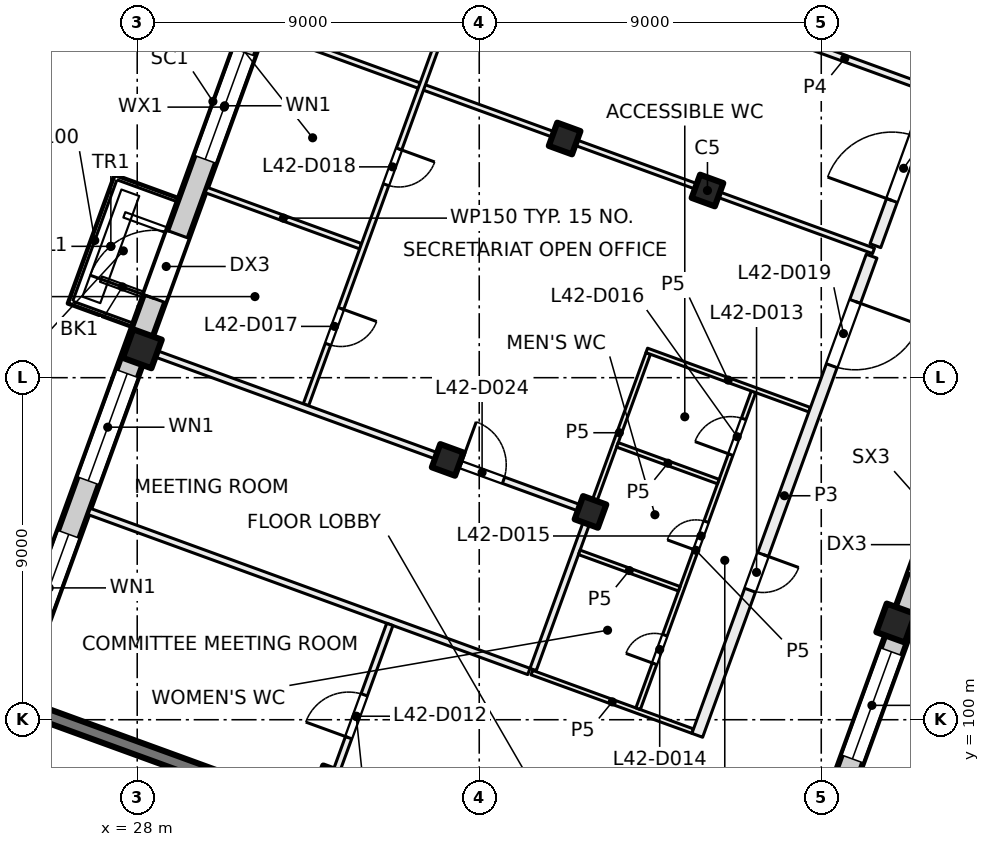
"""IFC4 building model, lengths in metres.
Left out: names, types, materials, properties, quantities, classifications, styles, units other than length and angle.
Written with IfcOpenShell. Run it as: python <this file> out.ifc"""

import sys

from ifc_helpers import new_model, si_unit, direction, frame, frame_2d, origin, origin_2d, place, context, subcontext, project, spatial, rectangle, extrude, element, fill, save


model = new_model("IFC4")
c1 = context("Model", 3, precision=1e-05, world=origin(), true_north=direction((0.0, 1.0)))
c2 = subcontext(c1, "Body", "Model", "MODEL_VIEW")
j1 = project(units=[si_unit("LENGTHUNIT", "METRE"), si_unit("PLANEANGLEUNIT", "RADIAN")], contexts=[c1])
p1 = place(None, origin())
s1 = spatial("IfcSite", under=j1, at=p1, CompositionType="ELEMENT")
p2 = place(p1, origin())
s2 = spatial("IfcBuilding", under=s1, at=p2, CompositionType="ELEMENT")
p3 = place(p2, frame((0.0, 0.0, 178.5)))
s3 = spatial("IfcBuildingStorey", under=s2, at=p3, CompositionType="ELEMENT", Elevation=178.5)
for number, where, z_axis, x_axis in (
    (1, (43.006, 113.925, 0.0), (0.0, 0.0, 1.0), (-0.342, -0.94, 0.0)),
    (2, (39.927, 105.468, 0.0), (0.0, 0.0, 1.0), (-0.342, -0.94, 0.0)),
    (3, (39.247, 115.293, 0.0), (0.0, 0.0, 1.0), (-0.342, -0.94, 0.0)),
    (4, (36.169, 106.836, 0.0), (0.0, 0.0, 1.0), (-0.342, -0.94, 0.0)),
    (5, (33.091, 98.379, 0.0), (0.0, 0.0, 1.0), (-0.342, -0.94, 0.0)),
):
    element("IfcColumn", number, at=place(p3, frame(where, z_axis=z_axis, x_axis=x_axis)), inside=s3, PredefinedType="COLUMN", context=c2, shape_type="SweptSolid", body=[
        extrude(rectangle(XDim=0.65, YDim=0.65, at=origin_2d()), origin(), (0.0, 0.0, 1.0), 4.0),
    ])
for number, where, z_axis, x_axis in (
    (6, (47.962, 102.544, 0.0), (0.0, 0.0, 1.0), (-0.342, -0.94, 0.0)),
    (7, (28.134, 109.76, 0.0), (0.0, 0.0, 1.0), (-0.342, -0.94, 0.0)),
):
    element("IfcColumn", number, at=place(p3, frame(where, z_axis=z_axis, x_axis=x_axis)), inside=s3, PredefinedType="COLUMN", context=c2, shape_type="SweptSolid", body=[
        extrude(rectangle(XDim=0.8, YDim=0.8, at=origin_2d()), origin(), (0.0, 0.0, 1.0), 4.0),
    ])
p4 = place(p3, frame((32.962, 97.441, 0.0), z_axis=(0.0, 0.0, 1.0), x_axis=(-0.939689545667, 0.342028592028, 0.0)))
e8 = element("IfcWall", 8, at=p4, inside=s3, PredefinedType="SHEAR", context=c2, shape_type="SweptSolid", body=[
    extrude(rectangle(XDim=8.65, YDim=0.35, at=frame_2d((4.325, 0.0))), origin(), (0.0, 0.0, 1.0), 4.0),
])
p5 = place(p3, frame((52.212, 113.783, 0.0), z_axis=(0.0, 0.0, 1.0), x_axis=(-0.34202521188, -0.939690775968, 0.0)))
e9 = element("IfcWall", 9, at=p5, inside=s3, PredefinedType="SOLIDWALL", context=c2, shape_type="SweptSolid", body=[
    extrude(rectangle(XDim=21.745, YDim=0.6, at=frame_2d((10.873, 0.0))), origin(), (0.0, 0.0, 1.0), 3.625),
])
p6 = place(p5, frame((3.765, 0.0, 0.9)))
e10 = element("IfcOpeningElement", 10, at=p6, cuts=e9, PredefinedType="OPENING", context=c2, shape_type="SweptSolid", body=[
    extrude(rectangle(XDim=3.0, YDim=2.4, at=frame_2d((1.5, 1.2))), frame((0.0, 0.31, 0.0), z_axis=(0.0, -1.0, 0.0), x_axis=(1.0, 0.0, 0.0)), (0.0, 0.0, 1.0), 0.62),
])
p7 = place(p5, frame((8.865, 0.0, 0.0)))
e11 = element("IfcOpeningElement", 11, at=p7, cuts=e9, PredefinedType="OPENING", context=c2, shape_type="SweptSolid", body=[
    extrude(rectangle(XDim=1.8, YDim=2.4, at=frame_2d((0.9, 1.2))), frame((0.0, 0.31, 0.0), z_axis=(0.0, -1.0, 0.0), x_axis=(1.0, 0.0, 0.0)), (0.0, 0.0, 1.0), 0.62),
])
p8 = place(p5, frame((12.765, 0.0, 0.9)))
e12 = element("IfcOpeningElement", 12, at=p8, cuts=e9, PredefinedType="OPENING", context=c2, shape_type="SweptSolid", body=[
    extrude(rectangle(XDim=3.0, YDim=2.4, at=frame_2d((1.5, 1.2))), frame((0.0, 0.31, 0.0), z_axis=(0.0, -1.0, 0.0), x_axis=(1.0, 0.0, 0.0)), (0.0, 0.0, 1.0), 0.62),
])
p9 = place(p5, frame((17.265, 0.0, 0.9)))
e13 = element("IfcOpeningElement", 13, at=p9, cuts=e9, PredefinedType="OPENING", context=c2, shape_type="SweptSolid", body=[
    extrude(rectangle(XDim=3.0, YDim=2.4, at=frame_2d((1.5, 1.2))), frame((0.0, 0.31, 0.0), z_axis=(0.0, -1.0, 0.0), x_axis=(1.0, 0.0, 0.0)), (0.0, 0.0, 1.0), 0.62),
])
p10 = place(p3, frame((24.666, 100.669, 0.0), z_axis=(0.0, 0.0, 1.0), x_axis=(0.34201964167, 0.939692803373, 0.0)))
e14 = element("IfcWall", 14, at=p10, inside=s3, PredefinedType="SOLIDWALL", context=c2, shape_type="SweptSolid", body=[
    extrude(rectangle(XDim=32.884, YDim=0.6, at=frame_2d((16.442, 0.0))), origin(), (0.0, 0.0, 1.0), 3.625),
])
p11 = place(p10, frame((1.48, 0.0, 0.9)))
e15 = element("IfcOpeningElement", 15, at=p11, cuts=e14, PredefinedType="OPENING", context=c2, shape_type="SweptSolid", body=[
    extrude(rectangle(XDim=3.0, YDim=2.4, at=frame_2d((1.5, 1.2))), frame((0.0, 0.31, 0.0), z_axis=(0.0, -1.0, 0.0), x_axis=(1.0, 0.0, 0.0)), (0.0, 0.0, 1.0), 0.62),
])
p12 = place(p10, frame((5.98, 0.0, 0.9)))
e16 = element("IfcOpeningElement", 16, at=p12, cuts=e14, PredefinedType="OPENING", context=c2, shape_type="SweptSolid", body=[
    extrude(rectangle(XDim=3.0, YDim=2.4, at=frame_2d((1.5, 1.2))), frame((0.0, 0.31, 0.0), z_axis=(0.0, -1.0, 0.0), x_axis=(1.0, 0.0, 0.0)), (0.0, 0.0, 1.0), 0.62),
])
p13 = place(p10, frame((11.08, 0.0, 0.0)))
e17 = element("IfcOpeningElement", 17, at=p13, cuts=e14, PredefinedType="OPENING", context=c2, shape_type="SweptSolid", body=[
    extrude(rectangle(XDim=1.8, YDim=2.4, at=frame_2d((0.9, 1.2))), frame((0.0, 0.31, 0.0), z_axis=(0.0, -1.0, 0.0), x_axis=(1.0, 0.0, 0.0)), (0.0, 0.0, 1.0), 0.62),
])
p14 = place(p10, frame((14.98, 0.0, 0.9)))
e18 = element("IfcOpeningElement", 18, at=p14, cuts=e14, PredefinedType="OPENING", context=c2, shape_type="SweptSolid", body=[
    extrude(rectangle(XDim=3.0, YDim=2.4, at=frame_2d((1.5, 1.2))), frame((0.0, 0.31, 0.0), z_axis=(0.0, -1.0, 0.0), x_axis=(1.0, 0.0, 0.0)), (0.0, 0.0, 1.0), 0.62),
])
p15 = place(p10, frame((19.48, 0.0, 0.9)))
e19 = element("IfcOpeningElement", 19, at=p15, cuts=e14, PredefinedType="OPENING", context=c2, shape_type="SweptSolid", body=[
    extrude(rectangle(XDim=3.0, YDim=2.4, at=frame_2d((1.5, 1.2))), frame((0.0, 0.31, 0.0), z_axis=(0.0, -1.0, 0.0), x_axis=(1.0, 0.0, 0.0)), (0.0, 0.0, 1.0), 0.62),
])
p16 = place(p10, frame((24.58, 0.0, 0.0)))
e20 = element("IfcOpeningElement", 20, at=p16, cuts=e14, PredefinedType="OPENING", context=c2, shape_type="SweptSolid", body=[
    extrude(rectangle(XDim=1.8, YDim=2.4, at=frame_2d((0.9, 1.2))), frame((0.0, 0.31, 0.0), z_axis=(0.0, -1.0, 0.0), x_axis=(1.0, 0.0, 0.0)), (0.0, 0.0, 1.0), 0.62),
])
p17 = place(p10, frame((28.48, 0.0, 0.9)))
e21 = element("IfcOpeningElement", 21, at=p17, cuts=e14, PredefinedType="OPENING", context=c2, shape_type="SweptSolid", body=[
    extrude(rectangle(XDim=3.0, YDim=2.4, at=frame_2d((1.5, 1.2))), frame((0.0, 0.31, 0.0), z_axis=(0.0, -1.0, 0.0), x_axis=(1.0, 0.0, 0.0)), (0.0, 0.0, 1.0), 0.62),
])
p18 = place(p3, frame((26.736, 105.48, 0.0), z_axis=(0.0, 0.0, 1.0), x_axis=(0.939721611154, -0.341940482438, 0.0)))
e22 = element("IfcWall", 22, at=p18, inside=s3, PredefinedType="PARTITIONING", context=c2, shape_type="SweptSolid", body=[
    extrude(rectangle(XDim=12.312, YDim=0.175, at=frame_2d((6.156, 0.0))), origin(), (0.0, 0.0, 1.0), 3.625),
])
p19 = place(p3, frame((29.814, 113.938, 0.0), z_axis=(0.0, 0.0, 1.0), x_axis=(0.93973078783, -0.341915262023, 0.0)))
e23 = element("IfcWall", 23, at=p19, inside=s3, PredefinedType="PARTITIONING", context=c2, shape_type="SweptSolid", body=[
    extrude(rectangle(XDim=4.326, YDim=0.15, at=frame_2d((2.163, 0.0))), origin(), (0.0, 0.0, 1.0), 3.625),
])
p20 = place(p3, frame((31.353, 118.166, 0.0), z_axis=(0.0, 0.0, 1.0), x_axis=(0.939701413127, -0.341995985602, 0.0)))
e24 = element("IfcWall", 24, at=p20, inside=s3, PredefinedType="PARTITIONING", context=c2, shape_type="SweptSolid", body=[
    extrude(rectangle(XDim=17.05, YDim=0.15, at=frame_2d((8.525, 0.0))), origin(), (0.0, 0.0, 1.0), 3.625),
])
p21 = place(p3, frame((37.053, 120.96, 0.0), z_axis=(0.0, 0.0, 1.0), x_axis=(-0.342023551531, -0.939691380293, 0.0)))
e25 = element("IfcWall", 25, at=p21, inside=s3, PredefinedType="PARTITIONING", context=c2, shape_type="SweptSolid", body=[
    extrude(rectangle(XDim=13.488, YDim=0.15, at=frame_2d((6.744, 0.0))), origin(), (0.0, 0.0, 1.0), 3.625),
])
p22 = place(p21, frame((10.791, 0.0, 0.0)))
e26 = element("IfcOpeningElement", 26, at=p22, cuts=e25, PredefinedType="OPENING", context=c2, shape_type="SweptSolid", body=[
    extrude(rectangle(XDim=1.0, YDim=2.1, at=frame_2d((0.5, 1.05))), frame((0.0, 0.085, 0.0), z_axis=(0.0, -1.0, 0.0), x_axis=(1.0, 0.0, 0.0)), (0.0, 0.0, 1.0), 0.17),
])
p23 = place(p21, frame((6.324, 0.0, 0.0)))
e27 = element("IfcOpeningElement", 27, at=p23, cuts=e25, PredefinedType="OPENING", context=c2, shape_type="SweptSolid", body=[
    extrude(rectangle(XDim=1.0, YDim=2.1, at=frame_2d((0.5, 1.05))), frame((0.0, 0.085, 0.0), z_axis=(0.0, -1.0, 0.0), x_axis=(1.0, 0.0, 0.0)), (0.0, 0.0, 1.0), 0.17),
])
p24 = place(p21, frame((1.824, 0.0, 0.0)))
e28 = element("IfcOpeningElement", 28, at=p24, cuts=e25, PredefinedType="OPENING", context=c2, shape_type="SweptSolid", body=[
    extrude(rectangle(XDim=1.0, YDim=2.1, at=frame_2d((0.5, 1.05))), frame((0.0, 0.085, 0.0), z_axis=(0.0, -1.0, 0.0), x_axis=(1.0, 0.0, 0.0)), (0.0, 0.0, 1.0), 0.17),
])
p25 = place(p3, frame((32.881, 97.657, 0.0), z_axis=(0.0, 0.0, 1.0), x_axis=(0.342058204353, 0.939678766832, 0.0)))
e29 = element("IfcWall", 29, at=p25, inside=s3, PredefinedType="PARTITIONING", context=c2, shape_type="SweptSolid", body=[
    extrude(rectangle(XDim=5.163, YDim=0.175, at=frame_2d((2.581, 0.0))), origin(), (0.0, 0.0, 1.0), 3.625),
])
p26 = place(p25, frame((1.991, 0.0, 0.0)))
e30 = element("IfcOpeningElement", 30, at=p26, cuts=e29, PredefinedType="OPENING", context=c2, shape_type="SweptSolid", body=[
    extrude(rectangle(XDim=1.2, YDim=2.1, at=frame_2d((0.6, 1.05))), frame((0.0, 0.097, 0.0), z_axis=(0.0, -1.0, 0.0), x_axis=(1.0, 0.0, 0.0)), (0.0, 0.0, 1.0), 0.195),
])
p27 = place(p3, frame((38.385, 101.24, 0.0), z_axis=(0.0, 0.0, 1.0), x_axis=(0.939711088937, -0.341969398235, 0.0)))
e31 = element("IfcWall", 31, at=p27, inside=s3, PredefinedType="PARTITIONING", context=c2, shape_type="SweptSolid", body=[
    extrude(rectangle(XDim=4.503, YDim=0.125, at=frame_2d((2.252, 0.0))), origin(), (0.0, 0.0, 1.0), 3.625),
])
p28 = place(p3, frame((38.418, 101.322, 0.0), z_axis=(0.0, 0.0, 1.0), x_axis=(0.341987815327, 0.939704386585, 0.0)))
e32 = element("IfcWall", 32, at=p28, inside=s3, PredefinedType="PARTITIONING", context=c2, shape_type="SweptSolid", body=[
    extrude(rectangle(XDim=4.325, YDim=0.175, at=frame_2d((2.162, 0.0))), origin(), (0.0, 0.0, 1.0), 3.625),
])
p29 = place(p3, frame((39.926, 105.465, 0.0), z_axis=(0.0, 0.0, 1.0), x_axis=(0.342263852659, 0.93960388205, 0.0)))
e33 = element("IfcWall", 33, at=p29, inside=s3, PredefinedType="PARTITIONING", context=c2, shape_type="SweptSolid", body=[
    extrude(rectangle(XDim=4.441, YDim=0.125, at=frame_2d((2.221, 0.0))), origin(), (0.0, 0.0, 1.0), 3.625),
])
p30 = place(p3, frame((28.275, 109.709, 0.0), z_axis=(0.0, 0.0, 1.0), x_axis=(0.939698441386, -0.342004150936, 0.0)))
e34 = element("IfcWall", 34, at=p30, inside=s3, PredefinedType="PARTITIONING", context=c2, shape_type="SweptSolid", body=[
    extrude(rectangle(XDim=12.312, YDim=0.175, at=frame_2d((6.156, 0.0))), origin(), (0.0, 0.0, 1.0), 3.625),
])
p31 = place(p30, frame((8.765, 0.0, 0.0)))
e35 = element("IfcOpeningElement", 35, at=p31, cuts=e34, PredefinedType="OPENING", context=c2, shape_type="SweptSolid", body=[
    extrude(rectangle(XDim=1.2, YDim=2.1, at=frame_2d((0.6, 1.05))), frame((0.0, 0.097, 0.0), z_axis=(0.0, -1.0, 0.0), x_axis=(1.0, 0.0, 0.0)), (0.0, 0.0, 1.0), 0.195),
])
p32 = place(p3, frame((41.181, 100.29, 0.0), z_axis=(0.0, 0.0, 1.0), x_axis=(0.34222012082, 0.939619810831, 0.0)))
e36 = element("IfcWall", 36, at=p32, inside=s3, PredefinedType="PARTITIONING", context=c2, shape_type="SweptSolid", body=[
    extrude(rectangle(XDim=8.875, YDim=0.125, at=frame_2d((4.438, 0.0))), origin(), (0.0, 0.0, 1.0), 3.625),
])
p33 = place(p32, frame((1.258, 0.0, 0.0)))
e37 = element("IfcOpeningElement", 37, at=p33, cuts=e36, PredefinedType="OPENING", context=c2, shape_type="SweptSolid", body=[
    extrude(rectangle(XDim=0.8, YDim=2.1, at=frame_2d((0.4, 1.05))), frame((0.0, 0.073, 0.0), z_axis=(0.0, -1.0, 0.0), x_axis=(1.0, 0.0, 0.0)), (0.0, 0.0, 1.0), 0.145),
])
p34 = place(p32, frame((4.437, 0.0, 0.0)))
e38 = element("IfcOpeningElement", 38, at=p34, cuts=e36, PredefinedType="OPENING", context=c2, shape_type="SweptSolid", body=[
    extrude(rectangle(XDim=0.8, YDim=2.1, at=frame_2d((0.4, 1.05))), frame((0.0, 0.073, 0.0), z_axis=(0.0, -1.0, 0.0), x_axis=(1.0, 0.0, 0.0)), (0.0, 0.0, 1.0), 0.145),
])
p35 = place(p32, frame((7.116, 0.0, 0.0)))
e39 = element("IfcOpeningElement", 39, at=p35, cuts=e36, PredefinedType="OPENING", context=c2, shape_type="SweptSolid", body=[
    extrude(rectangle(XDim=1.0, YDim=2.1, at=frame_2d((0.5, 1.05))), frame((0.0, 0.073, 0.0), z_axis=(0.0, -1.0, 0.0), x_axis=(1.0, 0.0, 0.0)), (0.0, 0.0, 1.0), 0.145),
])
p36 = place(p3, frame((41.408, 109.718, 0.0), z_axis=(0.0, 0.0, 1.0), x_axis=(0.939646475447, -0.3421469, 0.0)))
e40 = element("IfcWall", 40, at=p36, inside=s3, PredefinedType="PARTITIONING", context=c2, shape_type="SweptSolid", body=[
    extrude(rectangle(XDim=4.562, YDim=0.125, at=frame_2d((2.281, 0.0))), origin(), (0.0, 0.0, 1.0), 3.625),
])
p37 = place(p3, frame((42.264, 103.446, 0.0), z_axis=(0.0, 0.0, 1.0), x_axis=(-0.939640574808, 0.342163104635, 0.0)))
e41 = element("IfcWall", 41, at=p37, inside=s3, PredefinedType="PARTITIONING", context=c2, shape_type="SweptSolid", body=[
    extrude(rectangle(XDim=2.8, YDim=0.125, at=frame_2d((1.4, 0.0))), origin(), (0.0, 0.0, 1.0), 3.625),
])
p38 = place(p3, frame((47.325, 112.197, 0.0), z_axis=(0.0, 0.0, 1.0), x_axis=(-0.341976837053, -0.93970838185, 0.0)))
e42 = element("IfcWall", 42, at=p38, inside=s3, PredefinedType="PARTITIONING", context=c2, shape_type="SweptSolid", body=[
    extrude(rectangle(XDim=13.416, YDim=0.3, at=frame_2d((6.708, 0.0))), origin(), (0.0, 0.0, 1.0), 3.625),
])
p39 = place(p38, frame((8.354, 0.0, 0.0)))
e43 = element("IfcOpeningElement", 43, at=p39, cuts=e42, PredefinedType="OPENING", context=c2, shape_type="SweptSolid", body=[
    extrude(rectangle(XDim=1.0, YDim=2.1, at=frame_2d((0.5, 1.05))), frame((0.0, 0.16, 0.0), z_axis=(0.0, -1.0, 0.0), x_axis=(1.0, 0.0, 0.0)), (0.0, 0.0, 1.0), 0.32),
])
p40 = place(p38, frame((1.267, 0.0, 0.0)))
e44 = element("IfcOpeningElement", 44, at=p40, cuts=e42, PredefinedType="OPENING", context=c2, shape_type="SweptSolid", body=[
    extrude(rectangle(XDim=1.8, YDim=2.1, at=frame_2d((0.9, 1.05))), frame((0.0, 0.16, 0.0), z_axis=(0.0, -1.0, 0.0), x_axis=(1.0, 0.0, 0.0)), (0.0, 0.0, 1.0), 0.32),
])
p41 = place(p3, frame((43.29, 106.266, 0.0), z_axis=(0.0, 0.0, 1.0), x_axis=(-0.939601484935, 0.342270433294, 0.0)))
e45 = element("IfcWall", 45, at=p41, inside=s3, PredefinedType="PARTITIONING", context=c2, shape_type="SweptSolid", body=[
    extrude(rectangle(XDim=2.825, YDim=0.125, at=frame_2d((1.412, 0.0))), origin(), (0.0, 0.0, 1.0), 3.625),
])
p42 = place(p3, frame((44.463, 118.184, 0.0), z_axis=(0.0, 0.0, 1.0), x_axis=(0.939667480086, -0.342089208934, 0.0)))
e46 = element("IfcWall", 46, at=p42, inside=s3, PredefinedType="PARTITIONING", context=c2, shape_type="SweptSolid", body=[
    extrude(rectangle(XDim=4.587, YDim=0.175, at=frame_2d((2.293, 0.0))), origin(), (0.0, 0.0, 1.0), 3.625),
])
p43 = place(p3, frame((47.425, 112.473, 0.0), z_axis=(0.0, 0.0, 1.0), x_axis=(0.34204602842, 0.939683198978, 0.0)))
e47 = element("IfcWall", 47, at=p43, inside=s3, PredefinedType="PARTITIONING", context=c2, shape_type="SweptSolid", body=[
    extrude(rectangle(XDim=9.446, YDim=0.3, at=frame_2d((4.723, 0.0))), origin(), (0.0, 0.0, 1.0), 3.625),
])
p44 = place(p43, frame((6.003, 0.0, 0.0)))
e48 = element("IfcOpeningElement", 48, at=p44, cuts=e47, PredefinedType="OPENING", context=c2, shape_type="SweptSolid", body=[
    extrude(rectangle(XDim=1.2, YDim=2.1, at=frame_2d((0.6, 1.05))), frame((0.0, 0.16, 0.0), z_axis=(0.0, -1.0, 0.0), x_axis=(1.0, 0.0, 0.0)), (0.0, 0.0, 1.0), 0.32),
])
p45 = place(p43, frame((1.267, 0.0, 0.0)))
e49 = element("IfcOpeningElement", 49, at=p45, cuts=e47, PredefinedType="OPENING", context=c2, shape_type="SweptSolid", body=[
    extrude(rectangle(XDim=1.8, YDim=2.1, at=frame_2d((0.9, 1.05))), frame((0.0, 0.16, 0.0), z_axis=(0.0, -1.0, 0.0), x_axis=(1.0, 0.0, 0.0)), (0.0, 0.0, 1.0), 0.32),
])
p46 = place(p8, origin())
e50 = element("IfcWindow", 50, at=p46, inside=s3, PartitioningType="SINGLE_PANEL", PredefinedType="WINDOW", context=c2, shape_type="SweptSolid", body=[
    extrude(rectangle(XDim=3.0, YDim=2.4, at=frame_2d((1.5, 1.2))), frame((0.0, 0.03, 0.0), z_axis=(0.0, -1.0, 0.0), x_axis=(1.0, 0.0, 0.0)), (0.0, 0.0, 1.0), 0.06),
])
fill(e12, e50)
p47 = place(p11, origin())
e51 = element("IfcWindow", 51, at=p47, inside=s3, PartitioningType="SINGLE_PANEL", PredefinedType="WINDOW", context=c2, shape_type="SweptSolid", body=[
    extrude(rectangle(XDim=3.0, YDim=2.4, at=frame_2d((1.5, 1.2))), frame((0.0, 0.03, 0.0), z_axis=(0.0, -1.0, 0.0), x_axis=(1.0, 0.0, 0.0)), (0.0, 0.0, 1.0), 0.06),
])
fill(e15, e51)
p48 = place(p12, origin())
e52 = element("IfcWindow", 52, at=p48, inside=s3, PartitioningType="SINGLE_PANEL", PredefinedType="WINDOW", context=c2, shape_type="SweptSolid", body=[
    extrude(rectangle(XDim=3.0, YDim=2.4, at=frame_2d((1.5, 1.2))), frame((0.0, 0.03, 0.0), z_axis=(0.0, -1.0, 0.0), x_axis=(1.0, 0.0, 0.0)), (0.0, 0.0, 1.0), 0.06),
])
fill(e16, e52)
p49 = place(p13, origin())
e53 = element("IfcDoor", 53, at=p49, inside=s3, OperationType="DOUBLE_DOOR_SINGLE_SWING", PredefinedType="DOOR", context=c2, shape_type="SweptSolid", body=[
    extrude(rectangle(XDim=1.8, YDim=2.4, at=frame_2d((0.9, 1.2))), frame((0.0, 0.025, 0.0), z_axis=(0.0, -1.0, 0.0), x_axis=(1.0, 0.0, 0.0)), (0.0, 0.0, 1.0), 0.05),
])
fill(e17, e53)
p50 = place(p14, origin())
e54 = element("IfcWindow", 54, at=p50, inside=s3, PartitioningType="SINGLE_PANEL", PredefinedType="WINDOW", context=c2, shape_type="SweptSolid", body=[
    extrude(rectangle(XDim=3.0, YDim=2.4, at=frame_2d((1.5, 1.2))), frame((0.0, 0.03, 0.0), z_axis=(0.0, -1.0, 0.0), x_axis=(1.0, 0.0, 0.0)), (0.0, 0.0, 1.0), 0.06),
])
fill(e18, e54)
p51 = place(p26, origin())
e55 = element("IfcDoor", 55, at=p51, inside=s3, OperationType="DOUBLE_DOOR_SINGLE_SWING", PredefinedType="DOOR", context=c2, shape_type="SweptSolid", body=[
    extrude(rectangle(XDim=1.2, YDim=2.1, at=frame_2d((0.6, 1.05))), frame((0.0, 0.025, 0.0), z_axis=(0.0, -1.0, 0.0), x_axis=(1.0, 0.0, 0.0)), (0.0, 0.0, 1.0), 0.05),
])
fill(e30, e55)
p52 = place(p39, origin())
e56 = element("IfcDoor", 56, at=p52, inside=s3, OperationType="SINGLE_SWING_LEFT", PredefinedType="DOOR", context=c2, shape_type="SweptSolid", body=[
    extrude(rectangle(XDim=1.0, YDim=2.1, at=frame_2d((0.5, 1.05))), frame((0.0, 0.025, 0.0), z_axis=(0.0, -1.0, 0.0), x_axis=(1.0, 0.0, 0.0)), (0.0, 0.0, 1.0), 0.05),
])
fill(e43, e56)
p53 = place(p33, origin())
e57 = element("IfcDoor", 57, at=p53, inside=s3, OperationType="SINGLE_SWING_LEFT", PredefinedType="DOOR", context=c2, shape_type="SweptSolid", body=[
    extrude(rectangle(XDim=0.8, YDim=2.1, at=frame_2d((0.4, 1.05))), frame((0.0, 0.025, 0.0), z_axis=(0.0, -1.0, 0.0), x_axis=(1.0, 0.0, 0.0)), (0.0, 0.0, 1.0), 0.05),
])
fill(e37, e57)
p54 = place(p34, origin())
e58 = element("IfcDoor", 58, at=p54, inside=s3, OperationType="SINGLE_SWING_LEFT", PredefinedType="DOOR", context=c2, shape_type="SweptSolid", body=[
    extrude(rectangle(XDim=0.8, YDim=2.1, at=frame_2d((0.4, 1.05))), frame((0.0, 0.025, 0.0), z_axis=(0.0, -1.0, 0.0), x_axis=(1.0, 0.0, 0.0)), (0.0, 0.0, 1.0), 0.05),
])
fill(e38, e58)
p55 = place(p35, origin())
e59 = element("IfcDoor", 59, at=p55, inside=s3, OperationType="SINGLE_SWING_LEFT", PredefinedType="DOOR", context=c2, shape_type="SweptSolid", body=[
    extrude(rectangle(XDim=1.0, YDim=2.1, at=frame_2d((0.5, 1.05))), frame((0.0, 0.025, 0.0), z_axis=(0.0, -1.0, 0.0), x_axis=(1.0, 0.0, 0.0)), (0.0, 0.0, 1.0), 0.05),
])
fill(e39, e59)
p56 = place(p22, origin())
e60 = element("IfcDoor", 60, at=p56, inside=s3, OperationType="SINGLE_SWING_LEFT", PredefinedType="DOOR", context=c2, shape_type="SweptSolid", body=[
    extrude(rectangle(XDim=1.0, YDim=2.1, at=frame_2d((0.5, 1.05))), frame((0.0, 0.025, 0.0), z_axis=(0.0, -1.0, 0.0), x_axis=(1.0, 0.0, 0.0)), (0.0, 0.0, 1.0), 0.05),
])
fill(e26, e60)
p57 = place(p23, origin())
e61 = element("IfcDoor", 61, at=p57, inside=s3, OperationType="SINGLE_SWING_RIGHT", PredefinedType="DOOR", context=c2, shape_type="SweptSolid", body=[
    extrude(rectangle(XDim=1.0, YDim=2.1, at=frame_2d((0.5, 1.05))), frame((0.0, 0.025, 0.0), z_axis=(0.0, -1.0, 0.0), x_axis=(1.0, 0.0, 0.0)), (0.0, 0.0, 1.0), 0.05),
])
fill(e27, e61)
p58 = place(p40, origin())
e62 = element("IfcDoor", 62, at=p58, inside=s3, OperationType="DOUBLE_DOOR_SINGLE_SWING", PredefinedType="DOOR", context=c2, shape_type="SweptSolid", body=[
    extrude(rectangle(XDim=1.8, YDim=2.1, at=frame_2d((0.9, 1.05))), frame((0.0, 0.025, 0.0), z_axis=(0.0, -1.0, 0.0), x_axis=(1.0, 0.0, 0.0)), (0.0, 0.0, 1.0), 0.05),
])
fill(e44, e62)
p59 = place(p45, origin())
e63 = element("IfcDoor", 63, at=p59, inside=s3, OperationType="DOUBLE_DOOR_SINGLE_SWING", PredefinedType="DOOR", context=c2, shape_type="SweptSolid", body=[
    extrude(rectangle(XDim=1.8, YDim=2.1, at=frame_2d((0.9, 1.05))), frame((0.0, 0.025, 0.0), z_axis=(0.0, -1.0, 0.0), x_axis=(1.0, 0.0, 0.0)), (0.0, 0.0, 1.0), 0.05),
])
fill(e49, e63)
p60 = place(p31, origin())
e64 = element("IfcDoor", 64, at=p60, inside=s3, OperationType="DOUBLE_DOOR_SINGLE_SWING", PredefinedType="DOOR", context=c2, shape_type="SweptSolid", body=[
    extrude(rectangle(XDim=1.2, YDim=2.1, at=frame_2d((0.6, 1.05))), frame((0.0, 0.025, 0.0), z_axis=(0.0, -1.0, 0.0), x_axis=(1.0, 0.0, 0.0)), (0.0, 0.0, 1.0), 0.05),
])
fill(e35, e64)
save(model, sys.argv[1])
